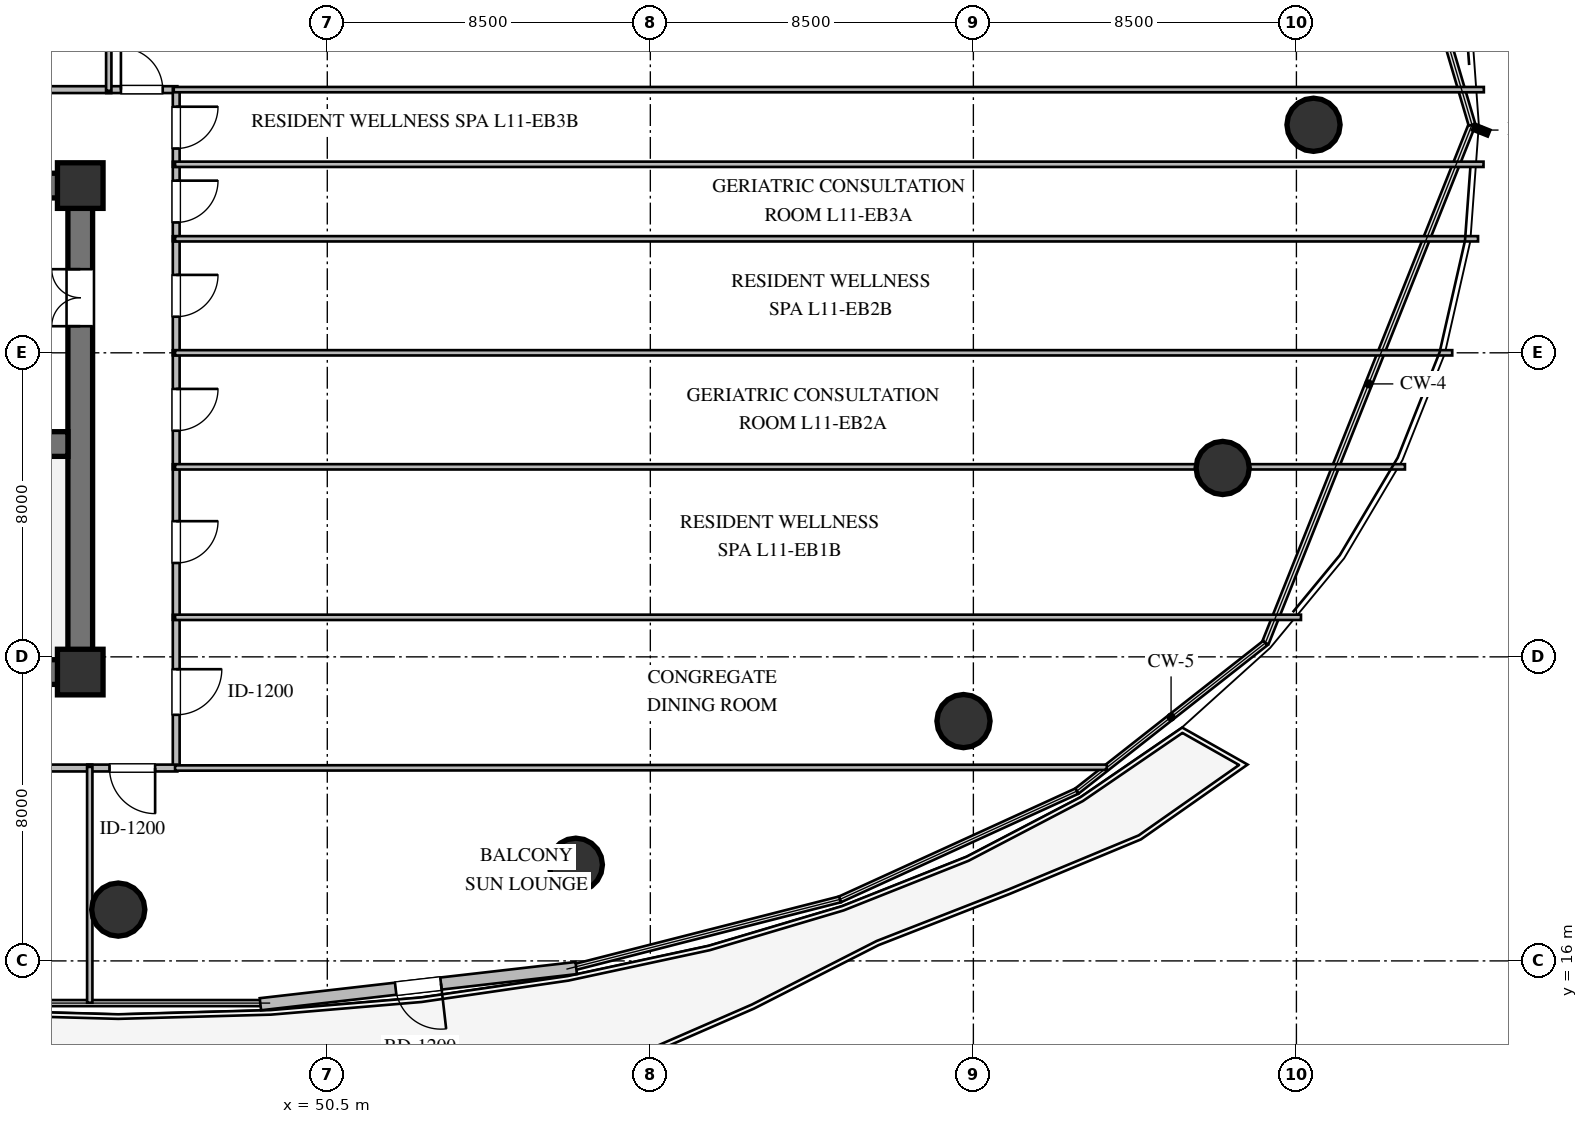
"""IFC4 building model, lengths in metres.
Left out: names, types, materials, properties, quantities, classifications, styles, units other than length and angle.
Written with IfcOpenShell. Run it as: python <this file> out.ifc"""

import sys

from ifc_helpers import new_model, si_unit, direction, frame, frame_2d, origin, origin_2d, place, context, subcontext, project, spatial, rectangle, circle, extrude, element, fill, save


model = new_model("IFC4")
c1 = context("Model", 3, precision=1e-05, world=origin(), true_north=direction((0.0, 1.0)))
c2 = subcontext(c1, "Body", "Model", "MODEL_VIEW")
j1 = project(units=[si_unit("LENGTHUNIT", "METRE"), si_unit("PLANEANGLEUNIT", "RADIAN")], contexts=[c1])
p1 = place(None, origin())
s1 = spatial("IfcSite", under=j1, at=p1, CompositionType="ELEMENT")
p2 = place(p1, origin())
s2 = spatial("IfcBuilding", under=s1, at=p2, CompositionType="ELEMENT")
p3 = place(p2, frame((0.0, 0.0, 45.6)))
s3 = spatial("IfcBuildingStorey", under=s2, at=p3, CompositionType="ELEMENT", Elevation=45.6)
for number, where, z_axis, x_axis in (
    (1, (21.675, 23.6, 0.0), (0.0, 0.0, 1.0), (1.0, 0.0, 0.0)),
    (2, (21.675, 36.4, 0.0), (0.0, 0.0, 1.0), (1.0, 0.0, 0.0)),
):
    element("IfcWall", number, at=place(p3, frame(where, z_axis=z_axis, x_axis=x_axis)), inside=s3, PredefinedType="SHEAR", context=c2, shape_type="SweptSolid", body=[
        extrude(rectangle(XDim=22.65, YDim=0.65, at=frame_2d((11.325, 0.0))), origin(), (0.0, 0.0, 1.0), 3.36),
    ])
p4 = place(p3, frame((44.0, 23.925, 0.0), z_axis=(0.0, 0.0, 1.0), x_axis=(0.0, 1.0, 0.0)))
e3 = element("IfcWall", 3, at=p4, inside=s3, PredefinedType="SHEAR", context=c2, shape_type="SweptSolid", body=[
    extrude(rectangle(XDim=12.15, YDim=0.65, at=frame_2d((6.075, 0.0))), origin(), (0.0, 0.0, 1.0), 3.36),
])
p5 = place(p4, frame((8.775, 0.0, 0.0)))
e4 = element("IfcOpeningElement", 4, at=p5, cuts=e3, PredefinedType="OPENING", context=c2, shape_type="SweptSolid", body=[
    extrude(rectangle(XDim=1.5, YDim=2.15, at=frame_2d((0.75, 1.075))), frame((0.0, 0.335, 0.0), z_axis=(0.0, -1.0, 0.0), x_axis=(1.0, 0.0, 0.0)), (0.0, 0.0, 1.0), 0.67),
])
p6 = place(p3, frame((22.325, 29.6, 0.0), z_axis=(0.0, 0.0, 1.0), x_axis=(1.0, 0.0, 0.0)))
e5 = element("IfcWall", 5, at=p6, inside=s3, PredefinedType="SHEAR", context=c2, shape_type="SweptSolid", body=[
    extrude(rectangle(XDim=21.35, YDim=0.65, at=frame_2d((10.675, 0.0))), origin(), (0.0, 0.0, 1.0), 3.36),
])
p7 = place(p6, frame((12.125, 0.0, 0.0)))
e6 = element("IfcOpeningElement", 6, at=p7, cuts=e5, PredefinedType="OPENING", context=c2, shape_type="SweptSolid", body=[
    extrude(rectangle(XDim=1.15, YDim=2.1, at=frame_2d((0.575, 1.05))), frame((0.0, 0.335, 0.0), z_axis=(0.0, -1.0, 0.0), x_axis=(1.0, 0.0, 0.0)), (0.0, 0.0, 1.0), 0.67),
])
for number, where, z_axis, x_axis in (
    (7, (44.0, 23.6, 0.0), (0.0, 0.0, 1.0), (1.0, 0.0, 0.0)),
    (8, (44.0, 36.4, 0.0), (0.0, 0.0, 1.0), (1.0, 0.0, 0.0)),
):
    element("IfcColumn", number, at=place(p3, frame(where, z_axis=z_axis, x_axis=x_axis)), inside=s3, PredefinedType="COLUMN", context=c2, shape_type="SweptSolid", body=[
        extrude(rectangle(XDim=1.2, YDim=1.2, at=origin_2d()), origin(), (0.0, 0.0, 1.0), 3.6),
    ])
for number, where, z_axis, x_axis in (
    (9, (76.45, 38.0, 0.0), (0.0, 0.0, 1.0), (1.0, 0.0, 0.0)),
    (10, (45.0, 17.35, 0.0), (0.0, 0.0, 1.0), (1.0, 0.0, 0.0)),
    (11, (57.04, 18.53, 0.0), (0.0, 0.0, 1.0), (1.0, 0.0, 0.0)),
    (12, (67.24, 22.31, 0.0), (0.0, 0.0, 1.0), (1.0, 0.0, 0.0)),
    (13, (74.06, 28.97, 0.0), (0.0, 0.0, 1.0), (1.0, 0.0, 0.0)),
):
    element("IfcColumn", number, at=place(p3, frame(where, z_axis=z_axis, x_axis=x_axis)), inside=s3, PredefinedType="COLUMN", context=c2, shape_type="SweptSolid", body=[
        extrude(circle(Radius=0.7, at=origin_2d()), origin(), (0.0, 0.0, 1.0), 3.6),
    ])
p8 = place(p3, frame((57.05, 15.812, 0.0), z_axis=(0.0, 0.0, 1.0), x_axis=(-0.993503192468, -0.113804246649, 0.0)))
e14 = element("IfcWall", 14, at=p8, inside=s3, PredefinedType="STANDARD", context=c2, shape_type="SweptSolid", body=[
    extrude(rectangle(XDim=8.365, YDim=0.32, at=frame_2d((4.182, 0.0))), origin(), (0.0, 0.0, 1.0), 3.36),
])
p9 = place(p8, frame((3.582, 0.0, 0.0)))
e15 = element("IfcOpeningElement", 15, at=p9, cuts=e14, PredefinedType="OPENING", context=c2, shape_type="SweptSolid", body=[
    extrude(rectangle(XDim=1.2, YDim=2.15, at=frame_2d((0.6, 1.075))), frame((0.0, 0.17, 0.0), z_axis=(0.0, -1.0, 0.0), x_axis=(1.0, 0.0, 0.0)), (0.0, 0.0, 1.0), 0.34),
])
p10 = place(p3, frame((39.935, 38.925, 0.0), z_axis=(0.0, 0.0, 1.0), x_axis=(1.0, 0.0, 0.0)))
e16 = element("IfcWall", 16, at=p10, inside=s3, PredefinedType="PARTITIONING", context=c2, shape_type="SweptSolid", body=[
    extrude(rectangle(XDim=4.88, YDim=0.18, at=frame_2d((2.44, 0.0))), origin(), (0.0, 0.0, 1.0), 3.36),
])
p11 = place(p10, frame((1.89, 0.0, 0.0)))
e17 = element("IfcOpeningElement", 17, at=p11, cuts=e16, PredefinedType="OPENING", context=c2, shape_type="SweptSolid", body=[
    extrude(rectangle(XDim=1.1, YDim=2.1, at=frame_2d((0.55, 1.05))), frame((0.0, 0.1, 0.0), z_axis=(0.0, -1.0, 0.0), x_axis=(1.0, 0.0, 0.0)), (0.0, 0.0, 1.0), 0.2),
])
p12 = place(p3, frame((44.685, 38.925, 0.0), z_axis=(0.0, 0.0, 1.0), x_axis=(1.0, 0.0, 0.0)))
e18 = element("IfcWall", 18, at=p12, inside=s3, PredefinedType="PARTITIONING", context=c2, shape_type="SweptSolid", body=[
    extrude(rectangle(XDim=1.87, YDim=0.18, at=frame_2d((0.935, 0.0))), origin(), (0.0, 0.0, 1.0), 3.36),
])
p13 = place(p12, frame((0.385, 0.0, 0.0)))
e19 = element("IfcOpeningElement", 19, at=p13, cuts=e18, PredefinedType="OPENING", context=c2, shape_type="SweptSolid", body=[
    extrude(rectangle(XDim=1.1, YDim=2.1, at=frame_2d((0.55, 1.05))), frame((0.0, 0.1, 0.0), z_axis=(0.0, -1.0, 0.0), x_axis=(1.0, 0.0, 0.0)), (0.0, 0.0, 1.0), 0.2),
])
p14 = place(p3, frame((46.525, 25.105, 0.0), z_axis=(0.0, 0.0, 1.0), x_axis=(0.0, -1.0, 0.0)))
e20 = element("IfcWall", 20, at=p14, inside=s3, PredefinedType="PARTITIONING", context=c2, shape_type="SweptSolid", body=[
    extrude(rectangle(XDim=4.06, YDim=0.18, at=frame_2d((2.03, 0.0))), origin(), (0.0, 0.0, 1.0), 3.36),
])
p15 = place(p14, frame((1.43, 0.0, 0.0)))
e21 = element("IfcOpeningElement", 21, at=p15, cuts=e20, PredefinedType="OPENING", context=c2, shape_type="SweptSolid", body=[
    extrude(rectangle(XDim=1.2, YDim=2.15, at=frame_2d((0.6, 1.075))), frame((0.0, 0.1, 0.0), z_axis=(0.0, -1.0, 0.0), x_axis=(1.0, 0.0, 0.0)), (0.0, 0.0, 1.0), 0.2),
])
p16 = place(p3, frame((46.525, 29.065, 0.0), z_axis=(0.0, 0.0, 1.0), x_axis=(0.0, -1.0, 0.0)))
e22 = element("IfcWall", 22, at=p16, inside=s3, PredefinedType="PARTITIONING", context=c2, shape_type="SweptSolid", body=[
    extrude(rectangle(XDim=4.09, YDim=0.18, at=frame_2d((2.045, 0.0))), origin(), (0.0, 0.0, 1.0), 3.36),
])
p17 = place(p16, frame((1.495, 0.0, 0.0)))
e23 = element("IfcOpeningElement", 23, at=p17, cuts=e22, PredefinedType="OPENING", context=c2, shape_type="SweptSolid", body=[
    extrude(rectangle(XDim=1.1, YDim=2.1, at=frame_2d((0.55, 1.05))), frame((0.0, 0.1, 0.0), z_axis=(0.0, -1.0, 0.0), x_axis=(1.0, 0.0, 0.0)), (0.0, 0.0, 1.0), 0.2),
])
p18 = place(p3, frame((46.525, 32.065, 0.0), z_axis=(0.0, 0.0, 1.0), x_axis=(0.0, -1.0, 0.0)))
e24 = element("IfcWall", 24, at=p18, inside=s3, PredefinedType="PARTITIONING", context=c2, shape_type="SweptSolid", body=[
    extrude(rectangle(XDim=3.13, YDim=0.18, at=frame_2d((1.565, 0.0))), origin(), (0.0, 0.0, 1.0), 3.36),
])
p19 = place(p18, frame((1.015, 0.0, 0.0)))
e25 = element("IfcOpeningElement", 25, at=p19, cuts=e24, PredefinedType="OPENING", context=c2, shape_type="SweptSolid", body=[
    extrude(rectangle(XDim=1.1, YDim=2.1, at=frame_2d((0.55, 1.05))), frame((0.0, 0.1, 0.0), z_axis=(0.0, -1.0, 0.0), x_axis=(1.0, 0.0, 0.0)), (0.0, 0.0, 1.0), 0.2),
])
p20 = place(p3, frame((46.525, 35.065, 0.0), z_axis=(0.0, 0.0, 1.0), x_axis=(0.0, -1.0, 0.0)))
e26 = element("IfcWall", 26, at=p20, inside=s3, PredefinedType="PARTITIONING", context=c2, shape_type="SweptSolid", body=[
    extrude(rectangle(XDim=3.13, YDim=0.18, at=frame_2d((1.565, 0.0))), origin(), (0.0, 0.0, 1.0), 3.36),
])
p21 = place(p20, frame((1.015, 0.0, 0.0)))
e27 = element("IfcOpeningElement", 27, at=p21, cuts=e26, PredefinedType="OPENING", context=c2, shape_type="SweptSolid", body=[
    extrude(rectangle(XDim=1.1, YDim=2.1, at=frame_2d((0.55, 1.05))), frame((0.0, 0.1, 0.0), z_axis=(0.0, -1.0, 0.0), x_axis=(1.0, 0.0, 0.0)), (0.0, 0.0, 1.0), 0.2),
])
p22 = place(p3, frame((46.525, 37.025, 0.0), z_axis=(0.0, 0.0, 1.0), x_axis=(0.0, -1.0, 0.0)))
e28 = element("IfcWall", 28, at=p22, inside=s3, PredefinedType="PARTITIONING", context=c2, shape_type="SweptSolid", body=[
    extrude(rectangle(XDim=2.09, YDim=0.18, at=frame_2d((1.045, 0.0))), origin(), (0.0, 0.0, 1.0), 3.36),
])
p23 = place(p22, frame((0.495, 0.0, 0.0)))
e29 = element("IfcOpeningElement", 29, at=p23, cuts=e28, PredefinedType="OPENING", context=c2, shape_type="SweptSolid", body=[
    extrude(rectangle(XDim=1.1, YDim=2.1, at=frame_2d((0.55, 1.05))), frame((0.0, 0.1, 0.0), z_axis=(0.0, -1.0, 0.0), x_axis=(1.0, 0.0, 0.0)), (0.0, 0.0, 1.0), 0.2),
])
p24 = place(p3, frame((46.525, 38.955, 0.0), z_axis=(0.0, 0.0, 1.0), x_axis=(0.0, -1.0, 0.0)))
e30 = element("IfcWall", 30, at=p24, inside=s3, PredefinedType="PARTITIONING", context=c2, shape_type="SweptSolid", body=[
    extrude(rectangle(XDim=2.06, YDim=0.18, at=frame_2d((1.03, 0.0))), origin(), (0.0, 0.0, 1.0), 3.36),
])
p25 = place(p24, frame((0.48, 0.0, 0.0)))
e31 = element("IfcOpeningElement", 31, at=p25, cuts=e30, PredefinedType="OPENING", context=c2, shape_type="SweptSolid", body=[
    extrude(rectangle(XDim=1.1, YDim=2.1, at=frame_2d((0.55, 1.05))), frame((0.0, 0.1, 0.0), z_axis=(0.0, -1.0, 0.0), x_axis=(1.0, 0.0, 0.0)), (0.0, 0.0, 1.0), 0.2),
])
p26 = place(p3, frame((44.315, 21.075, 0.0), z_axis=(0.0, 0.0, 1.0), x_axis=(-1.0, 0.0, 0.0)))
e32 = element("IfcWall", 32, at=p26, inside=s3, PredefinedType="PARTITIONING", context=c2, shape_type="SweptSolid", body=[
    extrude(rectangle(XDim=7.38, YDim=0.18, at=frame_2d((3.69, 0.0))), origin(), (0.0, 0.0, 1.0), 2.996),
])
p27 = place(p26, frame((3.14, 0.0, 0.0)))
e33 = element("IfcOpeningElement", 33, at=p27, cuts=e32, PredefinedType="OPENING", context=c2, shape_type="SweptSolid", body=[
    extrude(rectangle(XDim=1.1, YDim=2.1, at=frame_2d((0.55, 1.05))), frame((0.0, 0.1, 0.0), z_axis=(0.0, -1.0, 0.0), x_axis=(1.0, 0.0, 0.0)), (0.0, 0.0, 1.0), 0.2),
])
p28 = place(p3, frame((46.555, 21.075, 0.0), z_axis=(0.0, 0.0, 1.0), x_axis=(-1.0, 0.0, 0.0)))
e34 = element("IfcWall", 34, at=p28, inside=s3, PredefinedType="PARTITIONING", context=c2, shape_type="SweptSolid", body=[
    extrude(rectangle(XDim=2.37, YDim=0.18, at=frame_2d((1.185, 0.0))), origin(), (0.0, 0.0, 1.0), 3.36),
])
p29 = place(p28, frame((0.585, 0.0, 0.0)))
e35 = element("IfcOpeningElement", 35, at=p29, cuts=e34, PredefinedType="OPENING", context=c2, shape_type="SweptSolid", body=[
    extrude(rectangle(XDim=1.2, YDim=2.15, at=frame_2d((0.6, 1.075))), frame((0.0, 0.1, 0.0), z_axis=(0.0, -1.0, 0.0), x_axis=(1.0, 0.0, 0.0)), (0.0, 0.0, 1.0), 0.2),
])
p30 = place(p3, frame((44.75, 67.311, 0.0), z_axis=(0.0, 0.0, 1.0), x_axis=(0.0, -1.0, 0.0)))
e36 = element("IfcWall", 36, at=p30, inside=s3, PredefinedType="PARTITIONING", context=c2, shape_type="SweptSolid", body=[
    extrude(rectangle(XDim=28.416, YDim=0.14, at=frame_2d((14.208, 0.0))), origin(), (0.0, 0.0, 1.0), 2.89),
])
p31 = place(p3, frame((80.932, 38.925, 0.0), z_axis=(0.0, 0.0, 1.0), x_axis=(-1.0, 0.0, 0.0)))
e37 = element("IfcWall", 37, at=p31, inside=s3, PredefinedType="PARTITIONING", context=c2, shape_type="SweptSolid", body=[
    extrude(rectangle(XDim=34.472, YDim=0.14, at=frame_2d((17.236, 0.0))), origin(), (0.0, 0.0, 1.0), 3.36),
])
p32 = place(p3, frame((46.495, 25.04, 0.0), z_axis=(0.0, 0.0, 1.0), x_axis=(1.0, 0.0, 0.0)))
e38 = element("IfcWall", 38, at=p32, inside=s3, PredefinedType="PARTITIONING", context=c2, shape_type="SweptSolid", body=[
    extrude(rectangle(XDim=29.625, YDim=0.14, at=frame_2d((14.812, 0.0))), origin(), (0.0, 0.0, 1.0), 2.89),
])
p33 = place(p3, frame((71.011, 21.094, 0.0), z_axis=(0.0, 0.0, 1.0), x_axis=(-0.999999682646, -0.000796685534, 0.0)))
e39 = element("IfcWall", 39, at=p33, inside=s3, PredefinedType="PARTITIONING", context=c2, shape_type="SweptSolid", body=[
    extrude(rectangle(XDim=24.516, YDim=0.14, at=frame_2d((12.258, 0.0))), origin(), (0.0, 0.0, 1.0), 2.996),
])
p34 = place(p3, frame((46.495, 29.0, 0.0), z_axis=(0.0, 0.0, 1.0), x_axis=(1.0, 0.0, 0.0)))
e40 = element("IfcWall", 40, at=p34, inside=s3, PredefinedType="PARTITIONING", context=c2, shape_type="SweptSolid", body=[
    extrude(rectangle(XDim=32.361, YDim=0.14, at=frame_2d((16.18, 0.0))), origin(), (0.0, 0.0, 1.0), 2.89),
])
p35 = place(p3, frame((46.495, 32.0, 0.0), z_axis=(0.0, 0.0, 1.0), x_axis=(1.0, 0.0, 0.0)))
e41 = element("IfcWall", 41, at=p35, inside=s3, PredefinedType="PARTITIONING", context=c2, shape_type="SweptSolid", body=[
    extrude(rectangle(XDim=33.605, YDim=0.14, at=frame_2d((16.802, 0.0))), origin(), (0.0, 0.0, 1.0), 3.36),
])
p36 = place(p3, frame((46.495, 35.0, 0.0), z_axis=(0.0, 0.0, 1.0), x_axis=(1.0, 0.0, 0.0)))
e42 = element("IfcWall", 42, at=p36, inside=s3, PredefinedType="PARTITIONING", context=c2, shape_type="SweptSolid", body=[
    extrude(rectangle(XDim=34.284, YDim=0.14, at=frame_2d((17.142, 0.0))), origin(), (0.0, 0.0, 1.0), 3.36),
])
p37 = place(p3, frame((46.495, 36.96, 0.0), z_axis=(0.0, 0.0, 1.0), x_axis=(1.0, 0.0, 0.0)))
e43 = element("IfcWall", 43, at=p37, inside=s3, PredefinedType="PARTITIONING", context=c2, shape_type="SweptSolid", body=[
    extrude(rectangle(XDim=34.428, YDim=0.14, at=frame_2d((17.214, 0.0))), origin(), (0.0, 0.0, 1.0), 2.89),
])
p38 = place(p3, frame((44.25, 21.105, 0.0), z_axis=(0.0, 0.0, 1.0), x_axis=(0.0, -1.0, 0.0)))
e44 = element("IfcWall", 44, at=p38, inside=s3, PredefinedType="PARTITIONING", context=c2, shape_type="SweptSolid", body=[
    extrude(rectangle(XDim=6.205, YDim=0.14, at=frame_2d((3.103, 0.0))), origin(), (0.0, 0.0, 1.0), 2.89),
])
p39 = place(p9, origin())
e45 = element("IfcDoor", 45, at=p39, inside=s3, OperationType="SINGLE_SWING_LEFT", PredefinedType="DOOR", context=c2, shape_type="SweptSolid", body=[
    extrude(rectangle(XDim=1.2, YDim=2.15, at=frame_2d((0.6, 1.075))), frame((0.0, 0.025, 0.0), z_axis=(0.0, -1.0, 0.0), x_axis=(1.0, 0.0, 0.0)), (0.0, 0.0, 1.0), 0.05),
])
fill(e15, e45)
p40 = place(p5, origin())
e46 = element("IfcDoor", 46, at=p40, inside=s3, OperationType="DOUBLE_DOOR_SINGLE_SWING", PredefinedType="DOOR", context=c2, shape_type="SweptSolid", body=[
    extrude(rectangle(XDim=1.5, YDim=2.15, at=frame_2d((0.75, 1.075))), frame((0.0, 0.025, 0.0), z_axis=(0.0, -1.0, 0.0), x_axis=(1.0, 0.0, 0.0)), (0.0, 0.0, 1.0), 0.05),
])
fill(e4, e46)
p41 = place(p13, origin())
e47 = element("IfcDoor", 47, at=p41, inside=s3, OperationType="SINGLE_SWING_LEFT", PredefinedType="DOOR", context=c2, shape_type="SweptSolid", body=[
    extrude(rectangle(XDim=1.1, YDim=2.1, at=frame_2d((0.55, 1.05))), frame((0.0, 0.025, 0.0), z_axis=(0.0, -1.0, 0.0), x_axis=(1.0, 0.0, 0.0)), (0.0, 0.0, 1.0), 0.05),
])
fill(e19, e47)
p42 = place(p15, origin())
e48 = element("IfcDoor", 48, at=p42, inside=s3, OperationType="SINGLE_SWING_LEFT", PredefinedType="DOOR", context=c2, shape_type="SweptSolid", body=[
    extrude(rectangle(XDim=1.2, YDim=2.15, at=frame_2d((0.6, 1.075))), frame((0.0, 0.025, 0.0), z_axis=(0.0, -1.0, 0.0), x_axis=(1.0, 0.0, 0.0)), (0.0, 0.0, 1.0), 0.05),
])
fill(e21, e48)
p43 = place(p17, origin())
e49 = element("IfcDoor", 49, at=p43, inside=s3, OperationType="SINGLE_SWING_LEFT", PredefinedType="DOOR", context=c2, shape_type="SweptSolid", body=[
    extrude(rectangle(XDim=1.1, YDim=2.1, at=frame_2d((0.55, 1.05))), frame((0.0, 0.025, 0.0), z_axis=(0.0, -1.0, 0.0), x_axis=(1.0, 0.0, 0.0)), (0.0, 0.0, 1.0), 0.05),
])
fill(e23, e49)
p44 = place(p19, origin())
e50 = element("IfcDoor", 50, at=p44, inside=s3, OperationType="SINGLE_SWING_LEFT", PredefinedType="DOOR", context=c2, shape_type="SweptSolid", body=[
    extrude(rectangle(XDim=1.1, YDim=2.1, at=frame_2d((0.55, 1.05))), frame((0.0, 0.025, 0.0), z_axis=(0.0, -1.0, 0.0), x_axis=(1.0, 0.0, 0.0)), (0.0, 0.0, 1.0), 0.05),
])
fill(e25, e50)
p45 = place(p21, origin())
e51 = element("IfcDoor", 51, at=p45, inside=s3, OperationType="SINGLE_SWING_LEFT", PredefinedType="DOOR", context=c2, shape_type="SweptSolid", body=[
    extrude(rectangle(XDim=1.1, YDim=2.1, at=frame_2d((0.55, 1.05))), frame((0.0, 0.025, 0.0), z_axis=(0.0, -1.0, 0.0), x_axis=(1.0, 0.0, 0.0)), (0.0, 0.0, 1.0), 0.05),
])
fill(e27, e51)
p46 = place(p23, origin())
e52 = element("IfcDoor", 52, at=p46, inside=s3, OperationType="SINGLE_SWING_LEFT", PredefinedType="DOOR", context=c2, shape_type="SweptSolid", body=[
    extrude(rectangle(XDim=1.1, YDim=2.1, at=frame_2d((0.55, 1.05))), frame((0.0, 0.025, 0.0), z_axis=(0.0, -1.0, 0.0), x_axis=(1.0, 0.0, 0.0)), (0.0, 0.0, 1.0), 0.05),
])
fill(e29, e52)
p47 = place(p25, origin())
e53 = element("IfcDoor", 53, at=p47, inside=s3, OperationType="SINGLE_SWING_LEFT", PredefinedType="DOOR", context=c2, shape_type="SweptSolid", body=[
    extrude(rectangle(XDim=1.1, YDim=2.1, at=frame_2d((0.55, 1.05))), frame((0.0, 0.025, 0.0), z_axis=(0.0, -1.0, 0.0), x_axis=(1.0, 0.0, 0.0)), (0.0, 0.0, 1.0), 0.05),
])
fill(e31, e53)
p48 = place(p29, origin())
e54 = element("IfcDoor", 54, at=p48, inside=s3, OperationType="SINGLE_SWING_LEFT", PredefinedType="DOOR", context=c2, shape_type="SweptSolid", body=[
    extrude(rectangle(XDim=1.2, YDim=2.15, at=frame_2d((0.6, 1.075))), frame((0.0, 0.025, 0.0), z_axis=(0.0, -1.0, 0.0), x_axis=(1.0, 0.0, 0.0)), (0.0, 0.0, 1.0), 0.05),
])
fill(e35, e54)
save(model, sys.argv[1])
